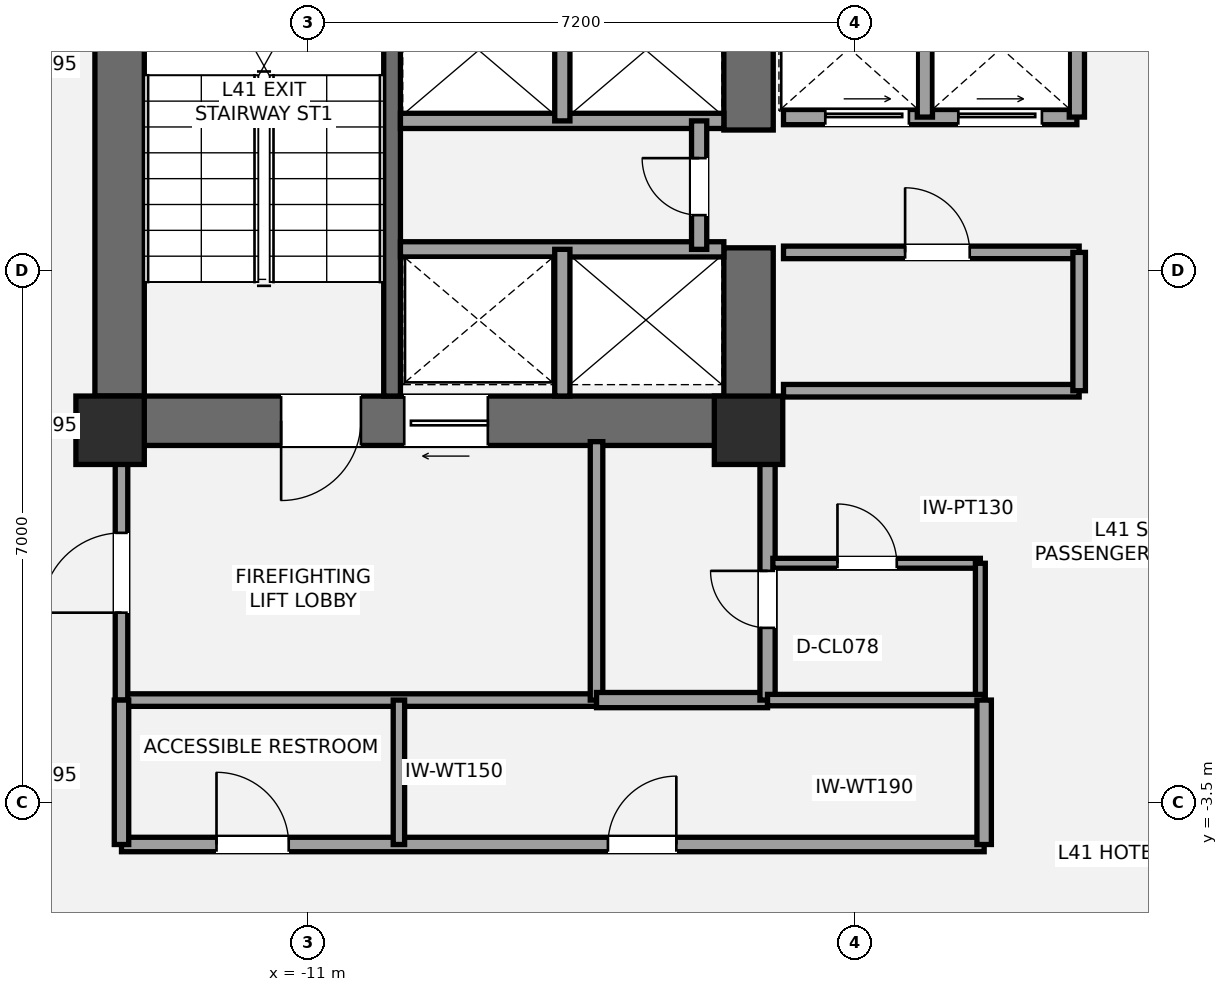
"""IFC4 building model, lengths in metres.
Left out: names, types, materials, properties, quantities, classifications, styles, units other than length and angle.
Written with IfcOpenShell. Run it as: python <this file> out.ifc"""

import sys

from ifc_helpers import new_model, si_unit, direction, frame, frame_2d, origin, origin_2d, place, context, subcontext, project, spatial, rectangle, extrude, element, fill, save


model = new_model("IFC4")
c1 = context("Model", 3, precision=1e-05, world=origin(), true_north=direction((0.0, 1.0)))
c2 = subcontext(c1, "Body", "Model", "MODEL_VIEW")
j1 = project(units=[si_unit("LENGTHUNIT", "METRE"), si_unit("PLANEANGLEUNIT", "RADIAN")], contexts=[c1])
p1 = place(None, origin())
s1 = spatial("IfcSite", under=j1, at=p1, CompositionType="ELEMENT")
p2 = place(p1, origin())
s2 = spatial("IfcBuilding", under=s1, at=p2, CompositionType="ELEMENT")
p3 = place(p2, frame((0.0, 0.0, 153.4)))
s3 = spatial("IfcBuildingStorey", under=s2, at=p3, CompositionType="ELEMENT", Elevation=153.4)
p4 = place(p3, frame((-13.475, 1.2, 0.0), z_axis=(0.0, 0.0, 1.0), x_axis=(0.0, 1.0, 0.0)))
e1 = element("IfcWall", 1, at=p4, inside=s3, PredefinedType="SHEAR", context=c2, shape_type="SweptSolid", body=[
    extrude(rectangle(XDim=8.45, YDim=0.65, at=frame_2d((4.225, 0.0))), origin(), (0.0, 0.0, 1.0), 3.2),
])
p5 = place(p3, frame((-4.875, 1.525, 0.0), z_axis=(0.0, 0.0, 1.0), x_axis=(-1.0, 0.0, 0.0)))
e2 = element("IfcWall", 2, at=p5, inside=s3, PredefinedType="SHEAR", context=c2, shape_type="SweptSolid", body=[
    extrude(rectangle(XDim=8.925, YDim=0.65, at=frame_2d((4.462, 0.0))), origin(), (0.0, 0.0, 1.0), 3.2),
])
p6 = place(p5, frame((5.425, 0.0, 0.0)))
e3 = element("IfcOpeningElement", 3, at=p6, cuts=e2, PredefinedType="OPENING", context=c2, shape_type="SweptSolid", body=[
    extrude(rectangle(XDim=1.05, YDim=2.15, at=frame_2d((0.525, 1.075))), frame((0.0, 0.335, 0.0), z_axis=(0.0, -1.0, 0.0), x_axis=(1.0, 0.0, 0.0)), (0.0, 0.0, 1.0), 0.67),
])
p7 = place(p5, frame((3.755, 0.0, 0.0)))
e4 = element("IfcOpeningElement", 4, at=p7, cuts=e2, PredefinedType="OPENING", context=c2, shape_type="SweptSolid", body=[
    extrude(rectangle(XDim=1.1, YDim=2.2, at=frame_2d((0.55, 1.1))), frame((0.0, 0.335, 0.0), z_axis=(0.0, -1.0, 0.0), x_axis=(1.0, 0.0, 0.0)), (0.0, 0.0, 1.0), 0.67),
])
p8 = place(p3, frame((-5.2, 1.2, 0.0), z_axis=(0.0, 0.0, 1.0), x_axis=(0.0, 1.0, 0.0)))
e5 = element("IfcWall", 5, at=p8, inside=s3, PredefinedType="SHEAR", context=c2, shape_type="SweptSolid", body=[
    extrude(rectangle(XDim=2.6, YDim=0.65, at=frame_2d((1.3, 0.0))), origin(), (0.0, 0.0, 1.0), 3.2),
])
p9 = place(p3, frame((-5.2, 5.35, 0.0), z_axis=(0.0, 0.0, 1.0), x_axis=(0.0, 1.0, 0.0)))
e6 = element("IfcWall", 6, at=p9, inside=s3, PredefinedType="SHEAR", context=c2, shape_type="SweptSolid", body=[
    extrude(rectangle(XDim=2.0, YDim=0.65, at=frame_2d((1.0, 0.0))), origin(), (0.0, 0.0, 1.0), 3.2),
])
p10 = place(p3, frame((-9.89, 1.85, 0.0), z_axis=(0.0, 0.0, 1.0), x_axis=(0.0, 1.0, 0.0)))
e7 = element("IfcWall", 7, at=p10, inside=s3, PredefinedType="SHEAR", context=c2, shape_type="SweptSolid", body=[
    extrude(rectangle(XDim=7.15, YDim=0.22, at=frame_2d((3.575, 0.0))), origin(), (0.0, 0.0, 1.0), 3.2),
])
for number, where, z_axis, x_axis in (
    (8, (-13.6, 1.4, 0.0), (0.0, 0.0, 1.0), (1.0, 0.0, 0.0)),
    (9, (-5.2, 1.4, 0.0), (0.0, 0.0, 1.0), (1.0, 0.0, 0.0)),
):
    element("IfcColumn", number, at=place(p3, frame(where, z_axis=z_axis, x_axis=x_axis)), inside=s3, PredefinedType="COLUMN", context=c2, shape_type="SweptSolid", body=[
        extrude(rectangle(XDim=0.9, YDim=0.9, at=origin_2d()), origin(), (0.0, 0.0, 1.0), 3.2),
    ])
p11 = place(p3, frame((-13.45, -2.15, 0.0), z_axis=(0.0, 0.0, 1.0), x_axis=(1.0, 0.0, 0.0)))
e10 = element("IfcWall", 10, at=p11, inside=s3, PredefinedType="PARTITIONING", context=c2, shape_type="SweptSolid", body=[
    extrude(rectangle(XDim=6.25, YDim=0.165, at=frame_2d((3.125, 0.0))), origin(), (0.0, 0.0, 1.0), 3.02),
])
p12 = place(p3, frame((-13.45, -2.15, 0.0), z_axis=(0.0, 0.0, 1.0), x_axis=(0.0, 1.0, 0.0)))
e11 = element("IfcWall", 11, at=p12, inside=s3, PredefinedType="PARTITIONING", context=c2, shape_type="SweptSolid", body=[
    extrude(rectangle(XDim=3.4, YDim=0.165, at=frame_2d((1.7, 0.0))), origin(), (0.0, 0.0, 1.0), 2.473),
])
p13 = place(p12, frame((1.15, 0.0, 0.0)))
e12 = element("IfcOpeningElement", 12, at=p13, cuts=e11, PredefinedType="OPENING", context=c2, shape_type="SweptSolid", body=[
    extrude(rectangle(XDim=1.05, YDim=2.15, at=frame_2d((0.525, 1.075))), frame((0.0, 0.093, 0.0), z_axis=(0.0, -1.0, 0.0), x_axis=(1.0, 0.0, 0.0)), (0.0, 0.0, 1.0), 0.185),
])
p14 = place(p3, frame((-7.2, -2.15, 0.0), z_axis=(0.0, 0.0, 1.0), x_axis=(0.0, 1.0, 0.0)))
e13 = element("IfcWall", 13, at=p14, inside=s3, PredefinedType="PARTITIONING", context=c2, shape_type="SweptSolid", body=[
    extrude(rectangle(XDim=3.4, YDim=0.165, at=frame_2d((1.7, 0.0))), origin(), (0.0, 0.0, 1.0), 2.473),
])
p15 = place(p3, frame((-7.2, -2.15, 0.0), z_axis=(0.0, 0.0, 1.0), x_axis=(1.0, 0.0, 0.0)))
e14 = element("IfcWall", 14, at=p15, inside=s3, PredefinedType="SOLIDWALL", context=c2, shape_type="SweptSolid", body=[
    extrude(rectangle(XDim=2.25, YDim=0.2, at=frame_2d((1.125, 0.0))), origin(), (0.0, 0.0, 1.0), 2.473),
])
p16 = place(p3, frame((-4.95, -2.15, 0.0), z_axis=(0.0, 0.0, 1.0), x_axis=(0.0, 1.0, 0.0)))
e15 = element("IfcWall", 15, at=p16, inside=s3, PredefinedType="SOLIDWALL", context=c2, shape_type="SweptSolid", body=[
    extrude(rectangle(XDim=3.4, YDim=0.2, at=frame_2d((1.7, 0.0))), origin(), (0.0, 0.0, 1.0), 2.473),
])
p17 = place(p16, frame((0.95, 0.0, 0.0)))
e16 = element("IfcOpeningElement", 16, at=p17, cuts=e15, PredefinedType="OPENING", context=c2, shape_type="SweptSolid", body=[
    extrude(rectangle(XDim=0.75, YDim=2.1, at=frame_2d((0.375, 1.05))), frame((0.0, 0.11, 0.0), z_axis=(0.0, -1.0, 0.0), x_axis=(1.0, 0.0, 0.0)), (0.0, 0.0, 1.0), 0.22),
])
p18 = place(p3, frame((-4.88, -0.35, 0.0), z_axis=(0.0, 0.0, 1.0), x_axis=(1.0, 0.0, 0.0)))
e17 = element("IfcWall", 17, at=p18, inside=s3, PredefinedType="PARTITIONING", context=c2, shape_type="SweptSolid", body=[
    extrude(rectangle(XDim=2.73, YDim=0.13, at=frame_2d((1.365, 0.0))), origin(), (0.0, 0.0, 1.0), 3.02),
])
p19 = place(p18, frame((0.85, 0.0, 0.0)))
e18 = element("IfcOpeningElement", 18, at=p19, cuts=e17, PredefinedType="OPENING", context=c2, shape_type="SweptSolid", body=[
    extrude(rectangle(XDim=0.78, YDim=2.1, at=frame_2d((0.39, 1.05))), frame((0.0, 0.075, 0.0), z_axis=(0.0, -1.0, 0.0), x_axis=(1.0, 0.0, 0.0)), (0.0, 0.0, 1.0), 0.15),
])
p20 = place(p3, frame((-2.15, -2.15, 0.0), z_axis=(0.0, 0.0, 1.0), x_axis=(0.0, 1.0, 0.0)))
e19 = element("IfcWall", 19, at=p20, inside=s3, PredefinedType="PARTITIONING", context=c2, shape_type="SweptSolid", body=[
    extrude(rectangle(XDim=1.8, YDim=0.13, at=frame_2d((0.9, 0.0))), origin(), (0.0, 0.0, 1.0), 3.02),
])
p21 = place(p3, frame((-9.78, 3.78, 0.0), z_axis=(0.0, 0.0, 1.0), x_axis=(1.0, 0.0, 0.0)))
e20 = element("IfcWall", 20, at=p21, inside=s3, PredefinedType="SOLIDWALL", context=c2, shape_type="SweptSolid", body=[
    extrude(rectangle(XDim=4.255, YDim=0.2, at=frame_2d((2.127, 0.0))), origin(), (0.0, 0.0, 1.0), 3.02),
])
p22 = place(p3, frame((-7.65, 1.85, 0.0), z_axis=(0.0, 0.0, 1.0), x_axis=(0.0, 1.0, 0.0)))
e21 = element("IfcWall", 21, at=p22, inside=s3, PredefinedType="SOLIDWALL", context=c2, shape_type="SweptSolid", body=[
    extrude(rectangle(XDim=1.93, YDim=0.2, at=frame_2d((0.965, 0.0))), origin(), (0.0, 0.0, 1.0), 3.02),
])
p23 = place(p3, frame((-9.78, 5.47, 0.0), z_axis=(0.0, 0.0, 1.0), x_axis=(1.0, 0.0, 0.0)))
e22 = element("IfcWall", 22, at=p23, inside=s3, PredefinedType="SOLIDWALL", context=c2, shape_type="SweptSolid", body=[
    extrude(rectangle(XDim=4.255, YDim=0.2, at=frame_2d((2.127, 0.0))), origin(), (0.0, 0.0, 1.0), 3.02),
])
p24 = place(p3, frame((-7.65, 5.47, 0.0), z_axis=(0.0, 0.0, 1.0), x_axis=(0.0, 1.0, 0.0)))
e23 = element("IfcWall", 23, at=p24, inside=s3, PredefinedType="SOLIDWALL", context=c2, shape_type="SweptSolid", body=[
    extrude(rectangle(XDim=1.86, YDim=0.2, at=frame_2d((0.93, 0.0))), origin(), (0.0, 0.0, 1.0), 3.02),
])
p25 = place(p3, frame((-5.85, 3.78, 0.0), z_axis=(0.0, 0.0, 1.0), x_axis=(0.0, 1.0, 0.0)))
e24 = element("IfcWall", 24, at=p25, inside=s3, PredefinedType="SOLIDWALL", context=c2, shape_type="SweptSolid", body=[
    extrude(rectangle(XDim=1.69, YDim=0.2, at=frame_2d((0.845, 0.0))), origin(), (0.0, 0.0, 1.0), 3.02),
])
p26 = place(p25, frame((0.45, 0.0, 0.0)))
e25 = element("IfcOpeningElement", 25, at=p26, cuts=e24, PredefinedType="OPENING", context=c2, shape_type="SweptSolid", body=[
    extrude(rectangle(XDim=0.75, YDim=2.1, at=frame_2d((0.375, 1.05))), frame((0.0, 0.11, 0.0), z_axis=(0.0, -1.0, 0.0), x_axis=(1.0, 0.0, 0.0)), (0.0, 0.0, 1.0), 0.22),
])
p27 = place(p3, frame((-4.74, 1.92, 0.0), z_axis=(0.0, 0.0, 1.0), x_axis=(1.0, 0.0, 0.0)))
e26 = element("IfcWall", 26, at=p27, inside=s3, PredefinedType="PARTITIONING", context=c2, shape_type="SweptSolid", body=[
    extrude(rectangle(XDim=3.89, YDim=0.165, at=frame_2d((1.945, 0.0))), origin(), (0.0, 0.0, 1.0), 2.16),
])
p28 = place(p3, frame((-4.74, 3.74, 0.0), z_axis=(0.0, 0.0, 1.0), x_axis=(1.0, 0.0, 0.0)))
e27 = element("IfcWall", 27, at=p28, inside=s3, PredefinedType="PARTITIONING", context=c2, shape_type="SweptSolid", body=[
    extrude(rectangle(XDim=3.89, YDim=0.165, at=frame_2d((1.945, 0.0))), origin(), (0.0, 0.0, 1.0), 3.02),
])
p29 = place(p28, frame((1.6, 0.0, 0.0)))
e28 = element("IfcOpeningElement", 28, at=p29, cuts=e27, PredefinedType="OPENING", context=c2, shape_type="SweptSolid", body=[
    extrude(rectangle(XDim=0.85, YDim=2.1, at=frame_2d((0.425, 1.05))), frame((0.0, 0.093, 0.0), z_axis=(0.0, -1.0, 0.0), x_axis=(1.0, 0.0, 0.0)), (0.0, 0.0, 1.0), 0.185),
])
p30 = place(p3, frame((-0.85, 1.92, 0.0), z_axis=(0.0, 0.0, 1.0), x_axis=(0.0, 1.0, 0.0)))
e29 = element("IfcWall", 29, at=p30, inside=s3, PredefinedType="PARTITIONING", context=c2, shape_type="SweptSolid", body=[
    extrude(rectangle(XDim=1.82, YDim=0.165, at=frame_2d((0.91, 0.0))), origin(), (0.0, 0.0, 1.0), 3.02),
])
p31 = place(p3, frame((-4.74, 5.52, 0.0), z_axis=(0.0, 0.0, 1.0), x_axis=(1.0, 0.0, 0.0)))
e30 = element("IfcWall", 30, at=p31, inside=s3, PredefinedType="SOLIDWALL", context=c2, shape_type="SweptSolid", body=[
    extrude(rectangle(XDim=3.86, YDim=0.2, at=frame_2d((1.93, 0.0))), origin(), (0.0, 0.0, 1.0), 3.02),
])
p32 = place(p31, frame((0.55, 0.0, 0.0)))
e31 = element("IfcOpeningElement", 31, at=p32, cuts=e30, PredefinedType="OPENING", context=c2, shape_type="SweptSolid", body=[
    extrude(rectangle(XDim=1.1, YDim=2.2, at=frame_2d((0.55, 1.1))), frame((0.0, 0.11, 0.0), z_axis=(0.0, -1.0, 0.0), x_axis=(1.0, 0.0, 0.0)), (0.0, 0.0, 1.0), 0.22),
])
p33 = place(p31, frame((2.3, 0.0, 0.0)))
e32 = element("IfcOpeningElement", 32, at=p33, cuts=e30, PredefinedType="OPENING", context=c2, shape_type="SweptSolid", body=[
    extrude(rectangle(XDim=1.1, YDim=2.2, at=frame_2d((0.55, 1.1))), frame((0.0, 0.11, 0.0), z_axis=(0.0, -1.0, 0.0), x_axis=(1.0, 0.0, 0.0)), (0.0, 0.0, 1.0), 0.22),
])
p34 = place(p3, frame((-2.88, 5.52, 0.0), z_axis=(0.0, 0.0, 1.0), x_axis=(0.0, 1.0, 0.0)))
e33 = element("IfcWall", 33, at=p34, inside=s3, PredefinedType="SOLIDWALL", context=c2, shape_type="SweptSolid", body=[
    extrude(rectangle(XDim=1.81, YDim=0.2, at=frame_2d((0.905, 0.0))), origin(), (0.0, 0.0, 1.0), 3.02),
])
p35 = place(p3, frame((-0.88, 5.52, 0.0), z_axis=(0.0, 0.0, 1.0), x_axis=(0.0, 1.0, 0.0)))
e34 = element("IfcWall", 34, at=p35, inside=s3, PredefinedType="SOLIDWALL", context=c2, shape_type="SweptSolid", body=[
    extrude(rectangle(XDim=1.81, YDim=0.2, at=frame_2d((0.905, 0.0))), origin(), (0.0, 0.0, 1.0), 2.473),
])
p36 = place(p3, frame((-13.45, -4.05, 0.0), z_axis=(0.0, 0.0, 1.0), x_axis=(1.0, 0.0, 0.0)))
e35 = element("IfcWall", 35, at=p36, inside=s3, PredefinedType="PLUMBINGWALL", context=c2, shape_type="SweptSolid", body=[
    extrude(rectangle(XDim=11.35, YDim=0.19, at=frame_2d((5.675, 0.0))), origin(), (0.0, 0.0, 1.0), 2.555),
])
p37 = place(p36, frame((1.25, 0.0, 0.0)))
e36 = element("IfcOpeningElement", 36, at=p37, cuts=e35, PredefinedType="OPENING", context=c2, shape_type="SweptSolid", body=[
    extrude(rectangle(XDim=0.95, YDim=2.15, at=frame_2d((0.475, 1.075))), frame((0.0, 0.105, 0.0), z_axis=(0.0, -1.0, 0.0), x_axis=(1.0, 0.0, 0.0)), (0.0, 0.0, 1.0), 0.21),
])
p38 = place(p36, frame((6.4, 0.0, 0.0)))
e37 = element("IfcOpeningElement", 37, at=p38, cuts=e35, PredefinedType="OPENING", context=c2, shape_type="SweptSolid", body=[
    extrude(rectangle(XDim=0.9, YDim=2.1, at=frame_2d((0.45, 1.05))), frame((0.0, 0.105, 0.0), z_axis=(0.0, -1.0, 0.0), x_axis=(1.0, 0.0, 0.0)), (0.0, 0.0, 1.0), 0.21),
])
p39 = place(p3, frame((-4.95, -2.15, 0.0), z_axis=(0.0, 0.0, 1.0), x_axis=(1.0, 0.0, 0.0)))
e38 = element("IfcWall", 38, at=p39, inside=s3, PredefinedType="PLUMBINGWALL", context=c2, shape_type="SweptSolid", body=[
    extrude(rectangle(XDim=2.85, YDim=0.15, at=frame_2d((1.425, 0.0))), origin(), (0.0, 0.0, 1.0), 2.473),
])
for number, where, z_axis, x_axis in (
    (39, (-13.45, -4.05, 0.0), (0.0, 0.0, 1.0), (0.0, 1.0, 0.0)),
    (40, (-2.1, -4.05, 0.0), (0.0, 0.0, 1.0), (0.0, 1.0, 0.0)),
):
    element("IfcWall", number, at=place(p3, frame(where, z_axis=z_axis, x_axis=x_axis)), inside=s3, PredefinedType="PLUMBINGWALL", context=c2, shape_type="SweptSolid", body=[
        extrude(rectangle(XDim=1.9, YDim=0.19, at=frame_2d((0.95, 0.0))), origin(), (0.0, 0.0, 1.0), 3.02),
    ])
p40 = place(p3, frame((-9.8, -4.05, 0.0), z_axis=(0.0, 0.0, 1.0), x_axis=(0.0, 1.0, 0.0)))
e41 = element("IfcWall", 41, at=p40, inside=s3, PredefinedType="PLUMBINGWALL", context=c2, shape_type="SweptSolid", body=[
    extrude(rectangle(XDim=1.9, YDim=0.15, at=frame_2d((0.95, 0.0))), origin(), (0.0, 0.0, 1.0), 3.02),
])
p41 = place(p6, origin())
e42 = element("IfcDoor", 42, at=p41, inside=s3, OperationType="SINGLE_SWING_RIGHT", PredefinedType="DOOR", context=c2, shape_type="SweptSolid", body=[
    extrude(rectangle(XDim=1.05, YDim=2.15, at=frame_2d((0.525, 1.075))), frame((0.0, 0.025, 0.0), z_axis=(0.0, -1.0, 0.0), x_axis=(1.0, 0.0, 0.0)), (0.0, 0.0, 1.0), 0.05),
])
fill(e3, e42)
p42 = place(p13, origin())
e43 = element("IfcDoor", 43, at=p42, inside=s3, OperationType="SINGLE_SWING_LEFT", PredefinedType="DOOR", context=c2, shape_type="SweptSolid", body=[
    extrude(rectangle(XDim=1.05, YDim=2.15, at=frame_2d((0.525, 1.075))), frame((0.0, 0.025, 0.0), z_axis=(0.0, -1.0, 0.0), x_axis=(1.0, 0.0, 0.0)), (0.0, 0.0, 1.0), 0.05),
])
fill(e12, e43)
p43 = place(p17, origin())
e44 = element("IfcDoor", 44, at=p43, inside=s3, OperationType="SINGLE_SWING_RIGHT", PredefinedType="DOOR", context=c2, shape_type="SweptSolid", body=[
    extrude(rectangle(XDim=0.75, YDim=2.1, at=frame_2d((0.375, 1.05))), frame((0.0, 0.025, 0.0), z_axis=(0.0, -1.0, 0.0), x_axis=(1.0, 0.0, 0.0)), (0.0, 0.0, 1.0), 0.05),
])
fill(e16, e44)
p44 = place(p19, origin())
e45 = element("IfcDoor", 45, at=p44, inside=s3, OperationType="SINGLE_SWING_LEFT", PredefinedType="DOOR", context=c2, shape_type="SweptSolid", body=[
    extrude(rectangle(XDim=0.78, YDim=2.1, at=frame_2d((0.39, 1.05))), frame((0.0, 0.025, 0.0), z_axis=(0.0, -1.0, 0.0), x_axis=(1.0, 0.0, 0.0)), (0.0, 0.0, 1.0), 0.05),
])
fill(e18, e45)
p45 = place(p7, origin())
e46 = element("IfcDoor", 46, at=p45, inside=s3, OperationType="SLIDING_TO_LEFT", PredefinedType="DOOR", context=c2, shape_type="SweptSolid", body=[
    extrude(rectangle(XDim=1.1, YDim=2.2, at=frame_2d((0.55, 1.1))), frame((0.0, 0.025, 0.0), z_axis=(0.0, -1.0, 0.0), x_axis=(1.0, 0.0, 0.0)), (0.0, 0.0, 1.0), 0.05),
])
fill(e4, e46)
p46 = place(p26, origin())
e47 = element("IfcDoor", 47, at=p46, inside=s3, OperationType="SINGLE_SWING_RIGHT", PredefinedType="DOOR", context=c2, shape_type="SweptSolid", body=[
    extrude(rectangle(XDim=0.75, YDim=2.1, at=frame_2d((0.375, 1.05))), frame((0.0, 0.025, 0.0), z_axis=(0.0, -1.0, 0.0), x_axis=(1.0, 0.0, 0.0)), (0.0, 0.0, 1.0), 0.05),
])
fill(e25, e47)
p47 = place(p29, origin())
e48 = element("IfcDoor", 48, at=p47, inside=s3, OperationType="SINGLE_SWING_LEFT", PredefinedType="DOOR", context=c2, shape_type="SweptSolid", body=[
    extrude(rectangle(XDim=0.85, YDim=2.1, at=frame_2d((0.425, 1.05))), frame((0.0, 0.025, 0.0), z_axis=(0.0, -1.0, 0.0), x_axis=(1.0, 0.0, 0.0)), (0.0, 0.0, 1.0), 0.05),
])
fill(e28, e48)
p48 = place(p32, origin())
e49 = element("IfcDoor", 49, at=p48, inside=s3, OperationType="SLIDING_TO_LEFT", PredefinedType="DOOR", context=c2, shape_type="SweptSolid", body=[
    extrude(rectangle(XDim=1.1, YDim=2.2, at=frame_2d((0.55, 1.1))), frame((0.0, 0.025, 0.0), z_axis=(0.0, -1.0, 0.0), x_axis=(1.0, 0.0, 0.0)), (0.0, 0.0, 1.0), 0.05),
])
fill(e31, e49)
p49 = place(p33, origin())
e50 = element("IfcDoor", 50, at=p49, inside=s3, OperationType="SLIDING_TO_LEFT", PredefinedType="DOOR", context=c2, shape_type="SweptSolid", body=[
    extrude(rectangle(XDim=1.1, YDim=2.2, at=frame_2d((0.55, 1.1))), frame((0.0, 0.025, 0.0), z_axis=(0.0, -1.0, 0.0), x_axis=(1.0, 0.0, 0.0)), (0.0, 0.0, 1.0), 0.05),
])
fill(e32, e50)
p50 = place(p37, origin())
e51 = element("IfcDoor", 51, at=p50, inside=s3, OperationType="SINGLE_SWING_LEFT", PredefinedType="DOOR", context=c2, shape_type="SweptSolid", body=[
    extrude(rectangle(XDim=0.95, YDim=2.15, at=frame_2d((0.475, 1.075))), frame((0.0, 0.025, 0.0), z_axis=(0.0, -1.0, 0.0), x_axis=(1.0, 0.0, 0.0)), (0.0, 0.0, 1.0), 0.05),
])
fill(e36, e51)
p51 = place(p38, origin())
e52 = element("IfcDoor", 52, at=p51, inside=s3, OperationType="SINGLE_SWING_RIGHT", PredefinedType="DOOR", context=c2, shape_type="SweptSolid", body=[
    extrude(rectangle(XDim=0.9, YDim=2.1, at=frame_2d((0.45, 1.05))), frame((0.0, 0.025, 0.0), z_axis=(0.0, -1.0, 0.0), x_axis=(1.0, 0.0, 0.0)), (0.0, 0.0, 1.0), 0.05),
])
fill(e37, e52)
save(model, sys.argv[1])
